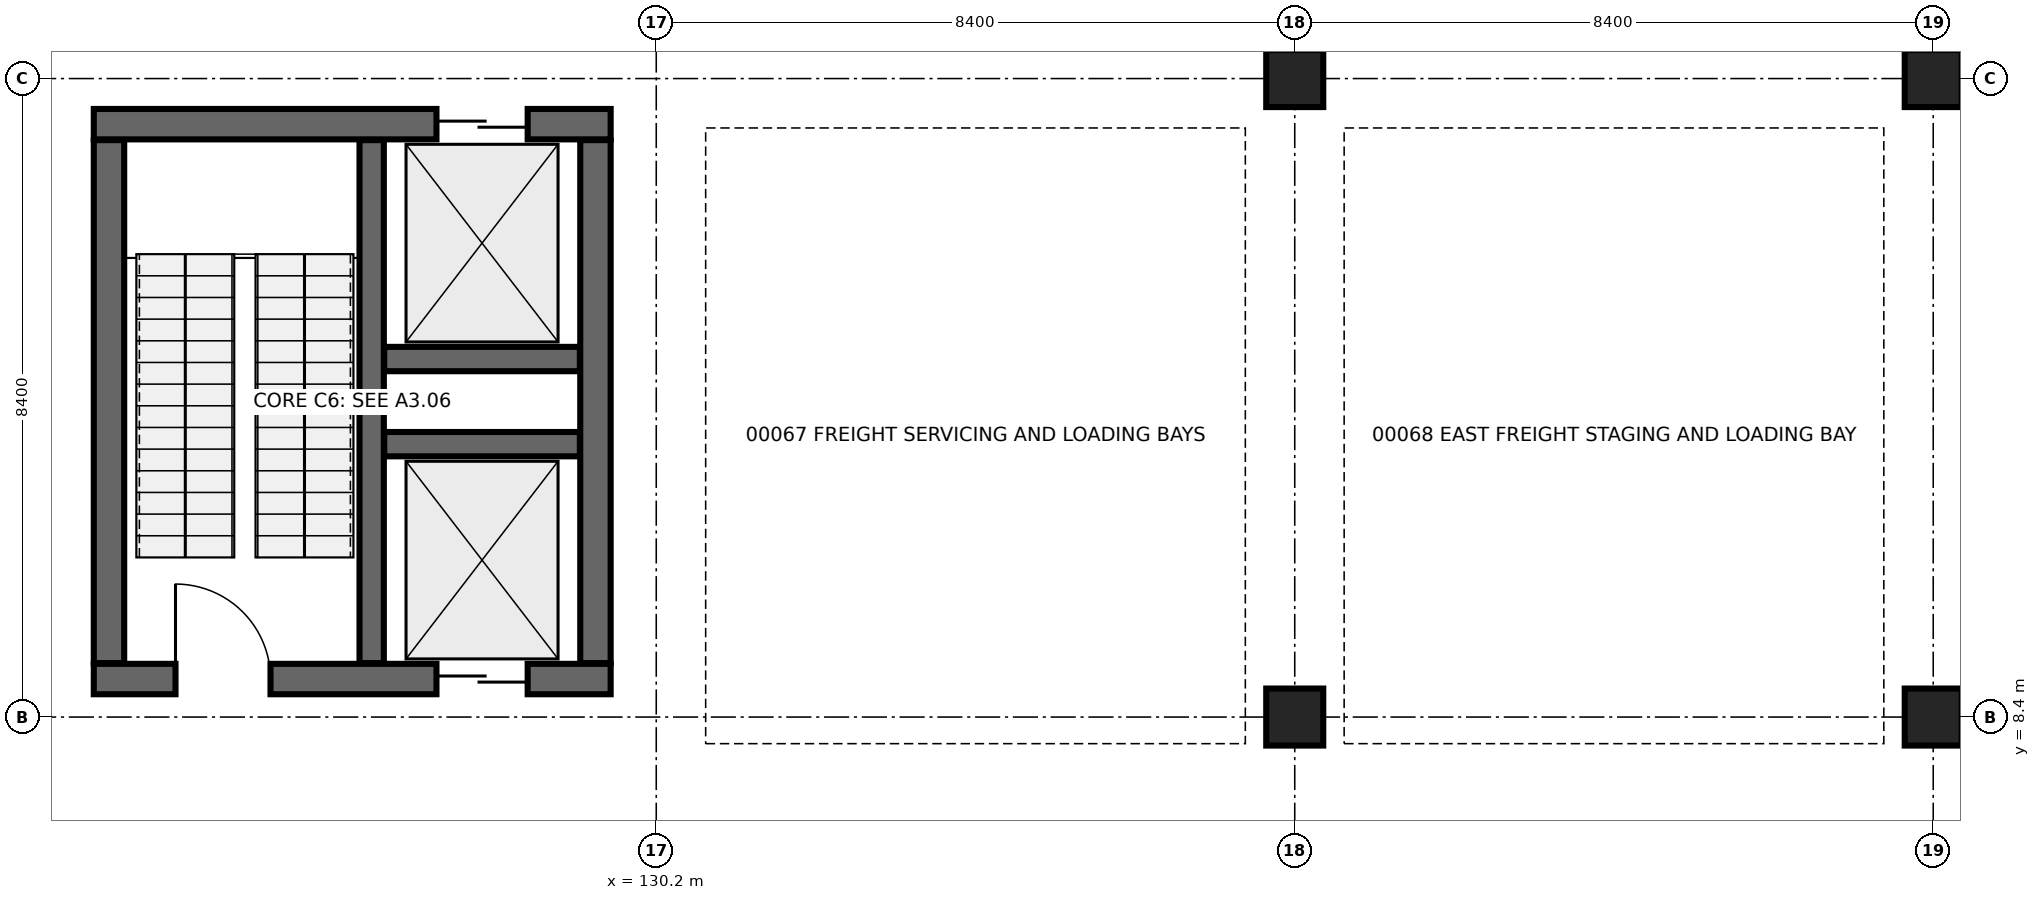
"""IFC4 building model, lengths in metres.
Left out: names, types, materials, properties, quantities, classifications, styles, units other than length and angle.
Written with IfcOpenShell. Run it as: python <this file> out.ifc"""

import sys

from ifc_helpers import new_model, si_unit, direction, frame, frame_2d, origin, origin_2d, place, context, subcontext, project, spatial, rectangle, extrude, element, fill, save


model = new_model("IFC4")
c1 = context("Model", 3, precision=1e-05, world=origin(), true_north=direction((0.0, 1.0)))
c2 = subcontext(c1, "Body", "Model", "MODEL_VIEW")
j1 = project(units=[si_unit("LENGTHUNIT", "METRE"), si_unit("PLANEANGLEUNIT", "RADIAN")], contexts=[c1])
p1 = place(None, origin())
s1 = spatial("IfcSite", under=j1, at=p1, CompositionType="ELEMENT")
p2 = place(p1, origin())
s2 = spatial("IfcBuilding", under=s1, at=p2, CompositionType="ELEMENT")
p3 = place(p2, origin())
s3 = spatial("IfcBuildingStorey", under=s2, at=p3, CompositionType="ELEMENT", Elevation=0.0)
for number, where, z_axis, x_axis in (
    (1, (138.6, 8.4, 0.0), (0.0, 0.0, 1.0), (1.0, 0.0, 0.0)),
    (2, (138.6, 16.8, 0.0), (0.0, 0.0, 1.0), (1.0, 0.0, 0.0)),
    (3, (147.0, 8.4, 0.0), (0.0, 0.0, 1.0), (1.0, 0.0, 0.0)),
    (4, (147.0, 16.8, 0.0), (0.0, 0.0, 1.0), (1.0, 0.0, 0.0)),
):
    element("IfcColumn", number, at=place(p3, frame(where, z_axis=z_axis, x_axis=x_axis)), inside=s3, PredefinedType="COLUMN", context=c2, shape_type="SweptSolid", body=[
        extrude(rectangle(XDim=0.75, YDim=0.75, at=origin_2d()), origin(), (0.0, 0.0, 1.0), 5.1),
    ])
p4 = place(p3, frame((122.8, 8.9, 0.0), z_axis=(0.0, 0.0, 1.0), x_axis=(1.0, 0.0, 0.0)))
e5 = element("IfcWall", 5, at=p4, inside=s3, PredefinedType="SHEAR", context=c2, shape_type="SweptSolid", body=[
    extrude(rectangle(XDim=6.8, YDim=0.4, at=frame_2d((3.4, 0.0))), origin(), (0.0, 0.0, 1.0), 4.82),
])
p5 = place(p4, frame((1.075, 0.0, 0.0)))
e6 = element("IfcOpeningElement", 6, at=p5, cuts=e5, PredefinedType="OPENING", context=c2, shape_type="SweptSolid", body=[
    extrude(rectangle(XDim=1.25, YDim=2.2, at=frame_2d((0.625, 1.1))), frame((0.0, 0.21, 0.0), z_axis=(0.0, -1.0, 0.0), x_axis=(1.0, 0.0, 0.0)), (0.0, 0.0, 1.0), 0.42),
])
p6 = place(p4, frame((4.508, 0.0, 0.0)))
e7 = element("IfcOpeningElement", 7, at=p6, cuts=e5, PredefinedType="OPENING", context=c2, shape_type="SweptSolid", body=[
    extrude(rectangle(XDim=1.2, YDim=2.25, at=frame_2d((0.6, 1.125))), frame((0.0, 0.21, 0.0), z_axis=(0.0, -1.0, 0.0), x_axis=(1.0, 0.0, 0.0)), (0.0, 0.0, 1.0), 0.42),
])
p7 = place(p3, frame((122.8, 16.2, 0.0), z_axis=(0.0, 0.0, 1.0), x_axis=(1.0, 0.0, 0.0)))
e8 = element("IfcWall", 8, at=p7, inside=s3, PredefinedType="SHEAR", context=c2, shape_type="SweptSolid", body=[
    extrude(rectangle(XDim=6.8, YDim=0.4, at=frame_2d((3.4, 0.0))), origin(), (0.0, 0.0, 1.0), 4.82),
])
p8 = place(p7, frame((4.508, 0.0, 0.0)))
e9 = element("IfcOpeningElement", 9, at=p8, cuts=e8, PredefinedType="OPENING", context=c2, shape_type="SweptSolid", body=[
    extrude(rectangle(XDim=1.2, YDim=2.25, at=frame_2d((0.6, 1.125))), frame((0.0, 0.21, 0.0), z_axis=(0.0, -1.0, 0.0), x_axis=(1.0, 0.0, 0.0)), (0.0, 0.0, 1.0), 0.42),
])
for number, where, z_axis, x_axis in (
    (10, (123.0, 9.11, 0.0), (0.0, 0.0, 1.0), (0.0, 1.0, 0.0)),
    (11, (129.4, 9.11, 0.0), (0.0, 0.0, 1.0), (0.0, 1.0, 0.0)),
):
    element("IfcWall", number, at=place(p3, frame(where, z_axis=z_axis, x_axis=x_axis)), inside=s3, PredefinedType="SHEAR", context=c2, shape_type="SweptSolid", body=[
        extrude(rectangle(XDim=6.88, YDim=0.4, at=frame_2d((3.44, 0.0))), origin(), (0.0, 0.0, 1.0), 4.82),
    ])
p9 = place(p3, frame((126.456, 9.11, 0.0), z_axis=(0.0, 0.0, 1.0), x_axis=(0.0, 1.0, 0.0)))
e12 = element("IfcWall", 12, at=p9, inside=s3, PredefinedType="SHEAR", context=c2, shape_type="SweptSolid", body=[
    extrude(rectangle(XDim=6.88, YDim=0.32, at=frame_2d((3.44, 0.0))), origin(), (0.0, 0.0, 1.0), 4.82),
])
for number, where, z_axis, x_axis in (
    (13, (126.621, 11.99, 0.0), (0.0, 0.0, 1.0), (1.0, 0.0, 0.0)),
    (14, (126.621, 13.11, 0.0), (0.0, 0.0, 1.0), (1.0, 0.0, 0.0)),
):
    element("IfcWall", number, at=place(p3, frame(where, z_axis=z_axis, x_axis=x_axis)), inside=s3, PredefinedType="SHEAR", context=c2, shape_type="SweptSolid", body=[
        extrude(rectangle(XDim=2.574, YDim=0.32, at=frame_2d((1.287, 0.0))), origin(), (0.0, 0.0, 1.0), 4.82),
    ])
p10 = place(p5, frame((1.25, 0.0, 0.0), z_axis=(0.0, 0.0, 1.0), x_axis=(-1.0, 0.0, 0.0)))
e15 = element("IfcDoor", 15, at=p10, inside=s3, OperationType="SINGLE_SWING_RIGHT", PredefinedType="DOOR", context=c2, shape_type="SweptSolid", body=[
    extrude(rectangle(XDim=1.25, YDim=2.2, at=frame_2d((0.625, 1.1))), frame((0.0, 0.025, 0.0), z_axis=(0.0, -1.0, 0.0), x_axis=(1.0, 0.0, 0.0)), (0.0, 0.0, 1.0), 0.05),
])
fill(e6, e15)
p11 = place(p6, frame((1.2, 0.0, 0.0), z_axis=(0.0, 0.0, 1.0), x_axis=(-1.0, 0.0, 0.0)))
e16 = element("IfcDoor", 16, at=p11, inside=s3, OperationType="DOUBLE_DOOR_SLIDING", PredefinedType="DOOR", context=c2, shape_type="SweptSolid", body=[
    extrude(rectangle(XDim=1.2, YDim=2.25, at=frame_2d((0.6, 1.125))), frame((0.0, 0.025, 0.0), z_axis=(0.0, -1.0, 0.0), x_axis=(1.0, 0.0, 0.0)), (0.0, 0.0, 1.0), 0.05),
])
fill(e7, e16)
p12 = place(p8, origin())
e17 = element("IfcDoor", 17, at=p12, inside=s3, OperationType="DOUBLE_DOOR_SLIDING", PredefinedType="DOOR", context=c2, shape_type="SweptSolid", body=[
    extrude(rectangle(XDim=1.2, YDim=2.25, at=frame_2d((0.6, 1.125))), frame((0.0, 0.025, 0.0), z_axis=(0.0, -1.0, 0.0), x_axis=(1.0, 0.0, 0.0)), (0.0, 0.0, 1.0), 0.05),
])
fill(e9, e17)
save(model, sys.argv[1])
